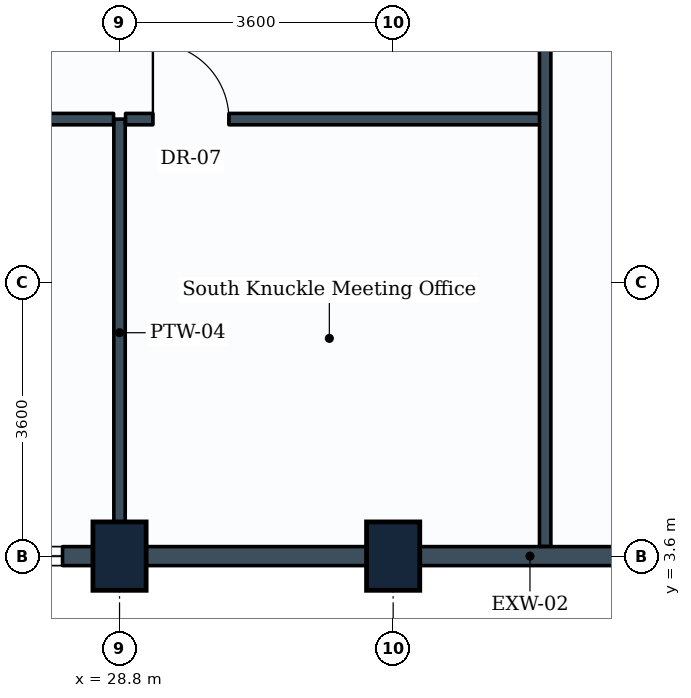
"""IFC4 building model, lengths in metres.
Left out: names, types, materials, properties, quantities, classifications, styles, units other than length and angle.
Written with IfcOpenShell. Run it as: python <this file> out.ifc"""

import sys

from ifc_helpers import new_model, si_unit, direction, frame, frame_2d, origin, origin_2d, place, context, subcontext, project, spatial, rectangle, extrude, element, fill, save


model = new_model("IFC4")
c1 = context("Model", 3, precision=1e-05, world=origin(), true_north=direction((0.0, 1.0)))
c2 = subcontext(c1, "Body", "Model", "MODEL_VIEW")
j1 = project(units=[si_unit("LENGTHUNIT", "METRE"), si_unit("PLANEANGLEUNIT", "RADIAN")], contexts=[c1])
p1 = place(None, origin())
s1 = spatial("IfcSite", under=j1, at=p1, CompositionType="ELEMENT")
p2 = place(p1, origin())
s2 = spatial("IfcBuilding", under=s1, at=p2, CompositionType="ELEMENT")
p3 = place(p2, frame((0.0, 0.0, 193.8)))
s3 = spatial("IfcBuildingStorey", under=s2, at=p3, CompositionType="ELEMENT", Elevation=193.8)
for number, where, z_axis, x_axis in (
    (1, (28.8, 3.6, 0.0), (0.0, 0.0, 1.0), (1.0, 0.0, 0.0)),
    (2, (32.4, 3.6, 0.0), (0.0, 0.0, 1.0), (1.0, 0.0, 0.0)),
):
    element("IfcColumn", number, at=place(p3, frame(where, z_axis=z_axis, x_axis=x_axis)), inside=s3, PredefinedType="COLUMN", context=c2, shape_type="SweptSolid", body=[
        extrude(rectangle(XDim=0.7, YDim=0.9, at=origin_2d()), origin(), (0.0, 0.0, 1.0), 3.8),
    ])
p4 = place(p3, frame((28.8, 3.6, 0.0), z_axis=(0.0, 0.0, 1.0), x_axis=(-1.0, 0.0, 0.0)))
e3 = element("IfcWall", 3, at=p4, inside=s3, PredefinedType="STANDARD", context=c2, shape_type="SweptSolid", body=[
    extrude(rectangle(XDim=3.6, YDim=0.25, at=frame_2d((1.8, 0.0))), origin(), (0.0, 0.0, 1.0), 2.93),
])
p5 = place(p4, frame((0.75, 0.0, 0.85)))
e4 = element("IfcOpeningElement", 4, at=p5, cuts=e3, PredefinedType="OPENING", context=c2, shape_type="SweptSolid", body=[
    extrude(rectangle(XDim=2.1, YDim=1.35, at=frame_2d((1.05, 0.675))), frame((0.0, 0.135, 0.0), z_axis=(0.0, -1.0, 0.0), x_axis=(1.0, 0.0, 0.0)), (0.0, 0.0, 1.0), 0.27),
])
p6 = place(p3, frame((32.4, 3.6, 0.0), z_axis=(0.0, 0.0, 1.0), x_axis=(-1.0, 0.0, 0.0)))
e5 = element("IfcWall", 5, at=p6, inside=s3, PredefinedType="STANDARD", context=c2, shape_type="SweptSolid", body=[
    extrude(rectangle(XDim=3.6, YDim=0.25, at=frame_2d((1.8, 0.0))), origin(), (0.0, 0.0, 1.0), 2.93),
])
p7 = place(p3, frame((36.0, 3.6, 0.0), z_axis=(0.0, 0.0, 1.0), x_axis=(-1.0, 0.0, 0.0)))
e6 = element("IfcWall", 6, at=p7, inside=s3, PredefinedType="STANDARD", context=c2, shape_type="SweptSolid", body=[
    extrude(rectangle(XDim=3.6, YDim=0.25, at=frame_2d((1.8, 0.0))), origin(), (0.0, 0.0, 1.0), 2.93),
])
p8 = place(p3, frame((28.8, 9.35, 0.0), z_axis=(0.0, 0.0, 1.0), x_axis=(0.0, -1.0, 0.0)))
e7 = element("IfcWall", 7, at=p8, inside=s3, PredefinedType="PARTITIONING", context=c2, shape_type="SweptSolid", body=[
    extrude(rectangle(XDim=5.621, YDim=0.15, at=frame_2d((2.811, 0.0))), origin(), (0.0, 0.0, 1.0), 3.535),
])
p9 = place(p3, frame((13.08, 9.35, 0.0), z_axis=(0.0, 0.0, 1.0), x_axis=(1.0, 0.0, 0.0)))
e8 = element("IfcWall", 8, at=p9, inside=s3, PredefinedType="PARTITIONING", context=c2, shape_type="SweptSolid", body=[
    extrude(rectangle(XDim=15.641, YDim=0.15, at=frame_2d((7.82, 0.0))), origin(), (0.0, 0.0, 1.0), 3.17),
])
p10 = place(p3, frame((28.879, 9.35, 0.0), z_axis=(0.0, 0.0, 1.0), x_axis=(1.0, 0.0, 0.0)))
e9 = element("IfcWall", 9, at=p10, inside=s3, PredefinedType="PARTITIONING", context=c2, shape_type="SweptSolid", body=[
    extrude(rectangle(XDim=5.521, YDim=0.15, at=frame_2d((2.76, 0.0))), origin(), (0.0, 0.0, 1.0), 3.535),
])
p11 = place(p10, frame((0.36, 0.0, 0.0)))
e10 = element("IfcOpeningElement", 10, at=p11, cuts=e9, PredefinedType="OPENING", context=c2, shape_type="SweptSolid", body=[
    extrude(rectangle(XDim=1.0, YDim=2.1, at=frame_2d((0.5, 1.05))), frame((0.0, 0.085, 0.0), z_axis=(0.0, -1.0, 0.0), x_axis=(1.0, 0.0, 0.0)), (0.0, 0.0, 1.0), 0.17),
])
p12 = place(p3, frame((34.4, 3.729, 0.0), z_axis=(0.0, 0.0, 1.0), x_axis=(0.0, 1.0, 0.0)))
e11 = element("IfcWall", 11, at=p12, inside=s3, PredefinedType="PARTITIONING", context=c2, shape_type="SweptSolid", body=[
    extrude(rectangle(XDim=14.121, YDim=0.15, at=frame_2d((7.061, 0.0))), origin(), (0.0, 0.0, 1.0), 2.93),
])
p13 = place(p5, origin())
e12 = element("IfcWindow", 12, at=p13, inside=s3, PartitioningType="SINGLE_PANEL", PredefinedType="WINDOW", context=c2, shape_type="SweptSolid", body=[
    extrude(rectangle(XDim=2.1, YDim=1.35, at=frame_2d((1.05, 0.675))), frame((0.0, 0.03, 0.0), z_axis=(0.0, -1.0, 0.0), x_axis=(1.0, 0.0, 0.0)), (0.0, 0.0, 1.0), 0.06),
])
fill(e4, e12)
p14 = place(p11, origin())
e13 = element("IfcDoor", 13, at=p14, inside=s3, OperationType="SINGLE_SWING_LEFT", PredefinedType="DOOR", context=c2, shape_type="SweptSolid", body=[
    extrude(rectangle(XDim=1.0, YDim=2.1, at=frame_2d((0.5, 1.05))), frame((0.0, 0.025, 0.0), z_axis=(0.0, -1.0, 0.0), x_axis=(1.0, 0.0, 0.0)), (0.0, 0.0, 1.0), 0.05),
])
fill(e10, e13)
save(model, sys.argv[1])
